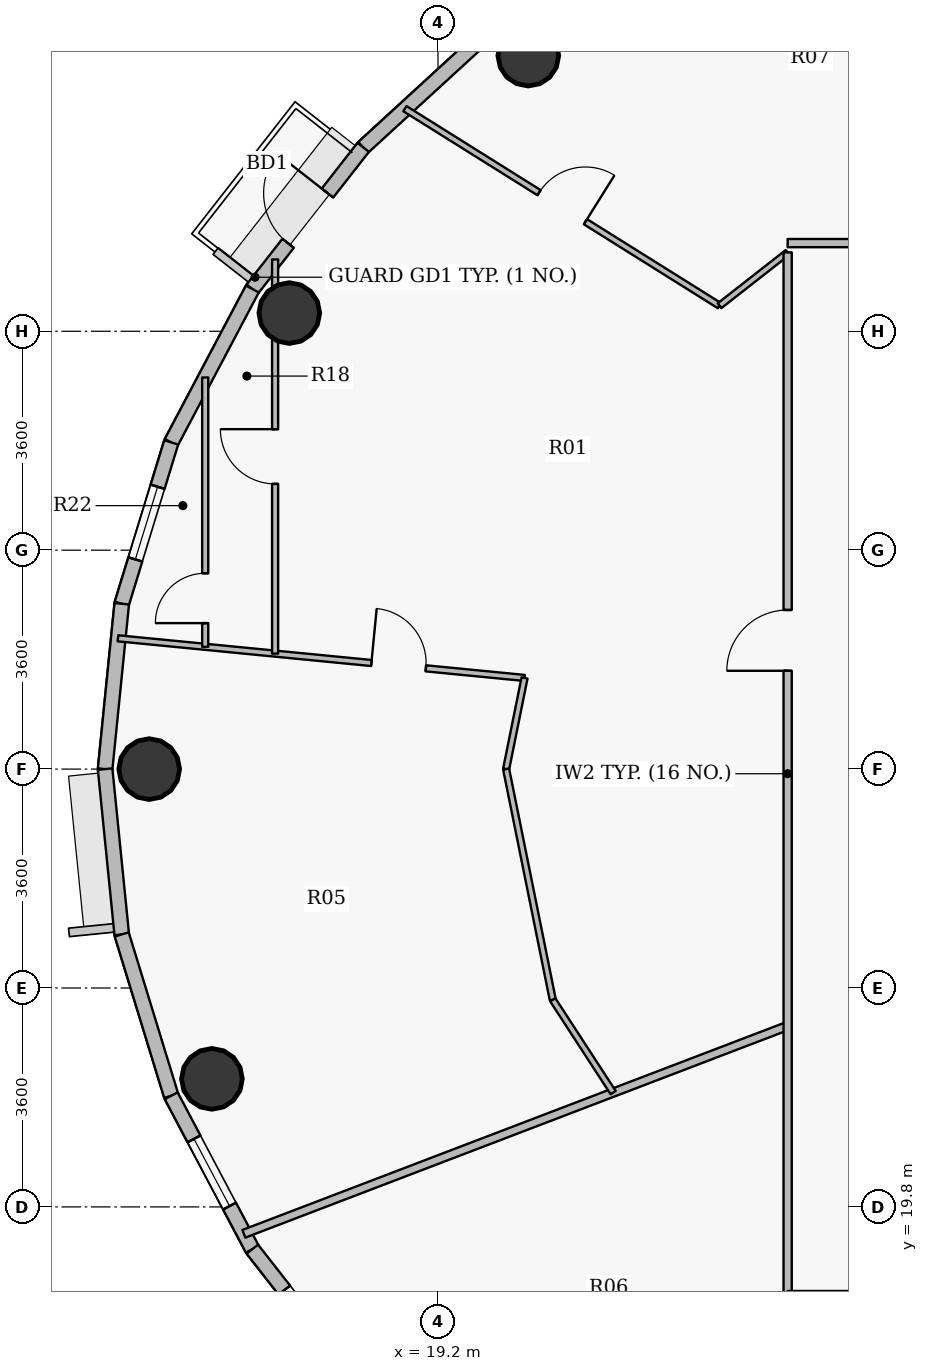
"""IFC4 building model, lengths in metres.
Left out: names, types, materials, properties, quantities, classifications, styles, units other than length and angle.
Written with IfcOpenShell. Run it as: python <this file> out.ifc"""

import sys

from ifc_helpers import new_model, si_unit, direction, frame, frame_2d, origin, origin_2d, place, context, subcontext, project, spatial, rectangle, hollow_circle, extrude, source, transform, mapped, element, fill, save


model = new_model("IFC4")
c1 = context("Model", 3, precision=1e-05, world=origin(), true_north=direction((0.0, 1.0)))
c2 = subcontext(c1, "Body", "Model", "MODEL_VIEW")
j1 = project(units=[si_unit("LENGTHUNIT", "METRE"), si_unit("PLANEANGLEUNIT", "RADIAN")], contexts=[c1])
p1 = place(None, origin())
s1 = spatial("IfcSite", under=j1, at=p1, CompositionType="ELEMENT")
p2 = place(p1, origin())
s2 = spatial("IfcBuilding", under=s1, at=p2, CompositionType="ELEMENT")
p3 = place(p2, frame((0.0, 0.0, 284.25)))
s3 = spatial("IfcBuildingStorey", under=s2, at=p3, CompositionType="ELEMENT", Elevation=284.25)
for number, where, z_axis, x_axis in (
    (1, (20.685, 38.733, 0.0), (0.0, 0.0, 1.0), (1.0, 0.0, 0.0)),
    (2, (16.754, 34.5, 0.0), (0.0, 0.0, 1.0), (1.0, 0.0, 0.0)),
    (3, (14.45, 27.0, 0.0), (0.0, 0.0, 1.0), (1.0, 0.0, 0.0)),
    (4, (15.481, 21.906, 0.0), (0.0, 0.0, 1.0), (1.0, 0.0, 0.0)),
):
    element("IfcColumn", number, at=place(p3, frame(where, z_axis=z_axis, x_axis=x_axis)), inside=s3, PredefinedType="COLUMN", context=c2, shape_type="SweptSolid", body=[
        extrude(hollow_circle(Radius=0.5, WallThickness=0.032, at=origin_2d()), origin(), (0.0, 0.0, 1.0), 3.75),
    ])
p4 = place(p3, frame((17.97, 37.225, 0.0), z_axis=(0.0, 0.0, 1.0), x_axis=(0.737068506972, 0.675818034703, 0.0)))
e5 = element("IfcWall", 5, at=p4, inside=s3, PredefinedType="SOLIDWALL", context=c2, shape_type="SweptSolid", body=[
    extrude(rectangle(XDim=3.077, YDim=0.24, at=frame_2d((1.539, 0.0))), origin(), (0.0, 0.0, 1.0), 3.5),
])
p5 = place(p3, frame((16.146, 34.895, 0.0), z_axis=(0.0, 0.0, 1.0), x_axis=(0.616337186556, 0.787482363275, 0.0)))
e6 = element("IfcWall", 6, at=p5, inside=s3, PredefinedType="SOLIDWALL", context=c2, shape_type="SweptSolid", body=[
    extrude(rectangle(XDim=2.958, YDim=0.24, at=frame_2d((1.479, 0.0))), origin(), (0.0, 0.0, 1.0), 3.5),
])
p6 = place(p5, frame((0.954, 0.0, 0.0)))
e7 = element("IfcOpeningElement", 7, at=p6, cuts=e6, PredefinedType="OPENING", context=c2, shape_type="SweptSolid", body=[
    extrude(rectangle(XDim=1.05, YDim=2.15, at=origin_2d()), frame((0.525, 0.13, 1.075), z_axis=(0.0, -1.0, 0.0), x_axis=(1.0, 0.0, 0.0)), (0.0, 0.0, 1.0), 0.26),
])
p7 = place(p3, frame((14.812, 32.372, 0.0), z_axis=(0.0, 0.0, 1.0), x_axis=(0.467628269026, 0.883925224218, 0.0)))
e8 = element("IfcWall", 8, at=p7, inside=s3, PredefinedType="SOLIDWALL", context=c2, shape_type="SweptSolid", body=[
    extrude(rectangle(XDim=2.854, YDim=0.24, at=frame_2d((1.427, 0.0))), origin(), (0.0, 0.0, 1.0), 3.5),
])
p8 = place(p3, frame((13.998, 29.719, 0.0), z_axis=(0.0, 0.0, 1.0), x_axis=(0.2931213403, 0.956075248012, 0.0)))
e9 = element("IfcWall", 9, at=p8, inside=s3, PredefinedType="SOLIDWALL", context=c2, shape_type="SweptSolid", body=[
    extrude(rectangle(XDim=2.775, YDim=0.24, at=frame_2d((1.388, 0.0))), origin(), (0.0, 0.0, 1.0), 3.5),
])
p9 = place(p8, frame((0.763, 0.0, 0.9)))
e10 = element("IfcOpeningElement", 10, at=p9, cuts=e9, PredefinedType="OPENING", context=c2, shape_type="SweptSolid", body=[
    extrude(rectangle(XDim=1.25, YDim=1.65, at=origin_2d()), frame((0.625, 0.13, 0.825), z_axis=(0.0, -1.0, 0.0), x_axis=(1.0, 0.0, 0.0)), (0.0, 0.0, 1.0), 0.26),
])
for number, where, z_axis, x_axis in (
    (11, (13.725, 27.0, 0.0), (0.0, 0.0, 1.0), (0.1, 0.995, 0.0)),
    (12, (13.998, 24.281, 0.0), (0.0, 0.0, 1.0), (-0.1, 0.995, 0.0)),
):
    element("IfcWall", number, at=place(p3, frame(where, z_axis=z_axis, x_axis=x_axis)), inside=s3, PredefinedType="SOLIDWALL", context=c2, shape_type="SweptSolid", body=[
        extrude(rectangle(XDim=2.733, YDim=0.24, at=frame_2d((1.366, 0.0))), origin(), (0.0, 0.0, 1.0), 3.5),
    ])
p10 = place(p3, frame((14.812, 21.628, 0.0), z_axis=(0.0, 0.0, 1.0), x_axis=(-0.2931213403, 0.956075248012, 0.0)))
e13 = element("IfcWall", 13, at=p10, inside=s3, PredefinedType="SOLIDWALL", context=c2, shape_type="SweptSolid", body=[
    extrude(rectangle(XDim=2.775, YDim=0.24, at=frame_2d((1.388, 0.0))), origin(), (0.0, 0.0, 1.0), 3.5),
])
p11 = place(p3, frame((16.146, 19.105, 0.0), z_axis=(0.0, 0.0, 1.0), x_axis=(-0.467628269026, 0.883925224218, 0.0)))
e14 = element("IfcWall", 14, at=p11, inside=s3, PredefinedType="SOLIDWALL", context=c2, shape_type="SweptSolid", body=[
    extrude(rectangle(XDim=2.854, YDim=0.24, at=frame_2d((1.427, 0.0))), origin(), (0.0, 0.0, 1.0), 3.5),
])
p12 = place(p11, frame((0.802, 0.0, 0.9)))
e15 = element("IfcOpeningElement", 15, at=p12, cuts=e14, PredefinedType="OPENING", context=c2, shape_type="SweptSolid", body=[
    extrude(rectangle(XDim=1.25, YDim=1.65, at=origin_2d()), frame((0.625, 0.13, 0.825), z_axis=(0.0, -1.0, 0.0), x_axis=(1.0, 0.0, 0.0)), (0.0, 0.0, 1.0), 0.26),
])
p13 = place(p3, frame((17.97, 16.775, 0.0), z_axis=(0.0, 0.0, 1.0), x_axis=(-0.616337186556, 0.787482363275, 0.0)))
e16 = element("IfcWall", 16, at=p13, inside=s3, PredefinedType="SOLIDWALL", context=c2, shape_type="SweptSolid", body=[
    extrude(rectangle(XDim=2.958, YDim=0.24, at=frame_2d((1.479, 0.0))), origin(), (0.0, 0.0, 1.0), 3.5),
])
p14 = place(p13, frame((0.854, 0.0, 0.9)))
e17 = element("IfcOpeningElement", 17, at=p14, cuts=e16, PredefinedType="OPENING", context=c2, shape_type="SweptSolid", body=[
    extrude(rectangle(XDim=1.25, YDim=1.65, at=origin_2d()), frame((0.625, 0.13, 0.825), z_axis=(0.0, -1.0, 0.0), x_axis=(1.0, 0.0, 0.0)), (0.0, 0.0, 1.0), 0.26),
])
p15 = place(p3, frame((13.936, 29.151, 0.0), z_axis=(0.0, 0.0, 1.0), x_axis=(0.995282339379, -0.097020950936, 0.0)))
e18 = element("IfcWall", 18, at=p15, inside=s3, PredefinedType="PARTITIONING", context=c2, shape_type="SweptSolid", body=[
    extrude(rectangle(XDim=6.719, YDim=0.1, at=frame_2d((3.359, 0.0))), origin(), (0.0, 0.0, 1.0), 2.985),
])
p16 = place(p15, frame((4.188, 0.0, 0.0)))
e19 = element("IfcOpeningElement", 19, at=p16, cuts=e18, PredefinedType="OPENING", context=c2, shape_type="SweptSolid", body=[
    extrude(rectangle(XDim=0.9, YDim=2.1, at=origin_2d()), frame((0.45, 0.06, 1.05), z_axis=(0.0, -1.0, 0.0), x_axis=(1.0, 0.0, 0.0)), (0.0, 0.0, 1.0), 0.12),
])
p17 = place(p3, frame((15.371, 29.011, 0.0), z_axis=(0.0, 0.0, 1.0), x_axis=(0.0, 1.0, 0.0)))
e20 = element("IfcWall", 20, at=p17, inside=s3, PredefinedType="PARTITIONING", context=c2, shape_type="SweptSolid", body=[
    extrude(rectangle(XDim=4.429, YDim=0.1, at=frame_2d((2.215, 0.0))), origin(), (0.0, 0.0, 1.0), 2.985),
])
p18 = place(p17, frame((0.389, 0.0, 0.0)))
e21 = element("IfcOpeningElement", 21, at=p18, cuts=e20, PredefinedType="OPENING", context=c2, shape_type="SweptSolid", body=[
    extrude(rectangle(XDim=0.82, YDim=2.1, at=origin_2d()), frame((0.41, 0.06, 1.05), z_axis=(0.0, -1.0, 0.0), x_axis=(1.0, 0.0, 0.0)), (0.0, 0.0, 1.0), 0.12),
])
p19 = place(p3, frame((16.007, 19.358, 0.0), z_axis=(0.0, 0.0, 1.0), x_axis=(0.934094110355, 0.35702687994, 0.0)))
e22 = element("IfcWall", 22, at=p19, inside=s3, PredefinedType="PARTITIONING", context=c2, shape_type="SweptSolid", body=[
    extrude(rectangle(XDim=9.574, YDim=0.135, at=frame_2d((4.787, 0.0))), origin(), (0.0, 0.0, 1.0), 2.985),
])
p20 = place(p3, frame((16.521, 28.899, 0.0), z_axis=(0.0, 0.0, 1.0), x_axis=(0.0, 1.0, 0.0)))
e23 = element("IfcWall", 23, at=p20, inside=s3, PredefinedType="PARTITIONING", context=c2, shape_type="SweptSolid", body=[
    extrude(rectangle(XDim=6.482, YDim=0.1, at=frame_2d((3.241, 0.0))), origin(), (0.0, 0.0, 1.0), 2.985),
])
p21 = place(p20, frame((2.791, 0.0, 0.0)))
e24 = element("IfcOpeningElement", 24, at=p21, cuts=e23, PredefinedType="OPENING", context=c2, shape_type="SweptSolid", body=[
    extrude(rectangle(XDim=0.9, YDim=2.1, at=origin_2d()), frame((0.45, 0.06, 1.05), z_axis=(0.0, -1.0, 0.0), x_axis=(1.0, 0.0, 0.0)), (0.0, 0.0, 1.0), 0.12),
])
p22 = place(p3, frame((18.656, 37.861, 0.0), z_axis=(0.0, 0.0, 1.0), x_axis=(0.847553170054, -0.530710489751, 0.0)))
e25 = element("IfcWall", 25, at=p22, inside=s3, PredefinedType="PARTITIONING", context=c2, shape_type="SweptSolid", body=[
    extrude(rectangle(XDim=6.105, YDim=0.1, at=frame_2d((3.052, 0.0))), origin(), (0.0, 0.0, 1.0), 2.985),
])
p23 = place(p22, frame((2.603, 0.0, 0.0)))
e26 = element("IfcOpeningElement", 26, at=p23, cuts=e25, PredefinedType="OPENING", context=c2, shape_type="SweptSolid", body=[
    extrude(rectangle(XDim=0.9, YDim=2.1, at=origin_2d()), frame((0.45, 0.06, 1.05), z_axis=(0.0, -1.0, 0.0), x_axis=(1.0, 0.0, 0.0)), (0.0, 0.0, 1.0), 0.12),
])
p24 = place(p3, frame((20.32, 27.0, 0.0), z_axis=(0.0, 0.0, 1.0), x_axis=(0.198264574188, 0.98014853906, 0.0)))
e27 = element("IfcWall", 27, at=p24, inside=s3, PredefinedType="PARTITIONING", context=c2, shape_type="SweptSolid", body=[
    extrude(rectangle(XDim=1.529, YDim=0.1, at=frame_2d((0.765, 0.0))), origin(), (0.0, 0.0, 1.0), 3.035),
])
p25 = place(p3, frame((20.32, 27.0, 0.0), z_axis=(0.0, 0.0, 1.0), x_axis=(0.198226068862, -0.980156327135, 0.0)))
e28 = element("IfcWall", 28, at=p25, inside=s3, PredefinedType="PARTITIONING", context=c2, shape_type="SweptSolid", body=[
    extrude(rectangle(XDim=3.871, YDim=0.1, at=frame_2d((1.936, 0.0))), origin(), (0.0, 0.0, 1.0), 3.035),
])
p26 = place(p3, frame((21.087, 23.206, 0.0), z_axis=(0.0, 0.0, 1.0), x_axis=(0.545384128846, -0.838186227519, 0.0)))
e29 = element("IfcWall", 29, at=p26, inside=s3, PredefinedType="PARTITIONING", context=c2, shape_type="SweptSolid", body=[
    extrude(rectangle(XDim=1.821, YDim=0.1, at=frame_2d((0.911, 0.0))), origin(), (0.0, 0.0, 1.0), 3.035),
])
p27 = place(p3, frame((23.83, 34.621, 0.0), z_axis=(0.0, 0.0, 1.0), x_axis=(0.787407186809, 0.616433226037, 0.0)))
e30 = element("IfcWall", 30, at=p27, inside=s3, PredefinedType="PARTITIONING", context=c2, shape_type="SweptSolid", body=[
    extrude(rectangle(XDim=1.422, YDim=0.1, at=frame_2d((0.711, 0.0))), origin(), (0.0, 0.0, 1.0), 3.035),
])
p28 = place(p3, frame((24.95, 18.35, 0.0), z_axis=(0.0, 0.0, 1.0), x_axis=(0.0, 1.0, 0.0)))
e31 = element("IfcWall", 31, at=p28, inside=s3, PredefinedType="PARTITIONING", context=c2, shape_type="SweptSolid", body=[
    extrude(rectangle(XDim=17.147, YDim=0.135, at=frame_2d((8.574, 0.0))), origin(), (0.0, 0.0, 1.0), 3.035),
])
p29 = place(p28, frame((10.267, 0.0, 0.0)))
e32 = element("IfcOpeningElement", 32, at=p29, cuts=e31, PredefinedType="OPENING", context=c2, shape_type="SweptSolid", body=[
    extrude(rectangle(XDim=1.0, YDim=2.15, at=origin_2d()), frame((0.5, 0.078, 1.075), z_axis=(0.0, -1.0, 0.0), x_axis=(1.0, 0.0, 0.0)), (0.0, 0.0, 1.0), 0.155),
])
p30 = place(p3, frame((24.95, 18.35, 0.0), z_axis=(0.0, 0.0, 1.0), x_axis=(1.0, 0.0, 0.0)))
e33 = element("IfcWall", 33, at=p30, inside=s3, PredefinedType="PARTITIONING", context=c2, shape_type="SweptSolid", body=[
    extrude(rectangle(XDim=10.1, YDim=0.135, at=frame_2d((5.05, 0.0))), origin(), (0.0, 0.0, 1.0), 3.035),
])
p31 = place(p30, frame((4.627, 0.0, 0.0)))
e34 = element("IfcOpeningElement", 34, at=p31, cuts=e33, PredefinedType="OPENING", context=c2, shape_type="SweptSolid", body=[
    extrude(rectangle(XDim=1.0, YDim=2.15, at=origin_2d()), frame((0.5, 0.078, 1.075), z_axis=(0.0, -1.0, 0.0), x_axis=(1.0, 0.0, 0.0)), (0.0, 0.0, 1.0), 0.155),
])
p32 = place(p3, frame((24.95, 35.65, 0.0), z_axis=(0.0, 0.0, 1.0), x_axis=(1.0, 0.0, 0.0)))
e35 = element("IfcWall", 35, at=p32, inside=s3, PredefinedType="PARTITIONING", context=c2, shape_type="SweptSolid", body=[
    extrude(rectangle(XDim=10.1, YDim=0.135, at=frame_2d((5.05, 0.0))), origin(), (0.0, 0.0, 1.0), 3.035),
])
m1 = source(origin(), c2, "Body", "SweptSolid", [
    extrude(rectangle(XDim=1.05, YDim=2.15, at=origin_2d()), frame((0.525, 0.025, 1.075), z_axis=(0.0, -1.0, 0.0), x_axis=(1.0, 0.0, 0.0)), (0.0, 0.0, 1.0), 0.05),
])
p33 = place(p6, origin())
e36 = element("IfcDoor", 36, at=p33, inside=s3, OperationType="SINGLE_SWING_RIGHT", PredefinedType="DOOR", context=c2, shape_type="MappedRepresentation", body=[
    mapped(m1, transform((0.0, 0.0, 0.0), x_axis=(1.0, 0.0, 0.0), y_axis=(0.0, 1.0, 0.0), z_axis=(0.0, 0.0, 1.0), scale=1.0)),
])
fill(e7, e36)
m2 = source(origin(), c2, "Body", "SweptSolid", [
    extrude(rectangle(XDim=1.25, YDim=1.65, at=origin_2d()), frame((0.625, 0.03, 0.825), z_axis=(0.0, -1.0, 0.0), x_axis=(1.0, 0.0, 0.0)), (0.0, 0.0, 1.0), 0.06),
])
p34 = place(p9, origin())
e37 = element("IfcWindow", 37, at=p34, inside=s3, PartitioningType="SINGLE_PANEL", PredefinedType="WINDOW", context=c2, shape_type="MappedRepresentation", body=[
    mapped(m2, transform((0.0, 0.0, 0.0), x_axis=(1.0, 0.0, 0.0), y_axis=(0.0, 1.0, 0.0), z_axis=(0.0, 0.0, 1.0), scale=1.0)),
])
fill(e10, e37)
p35 = place(p14, origin())
e38 = element("IfcWindow", 38, at=p35, inside=s3, PartitioningType="SINGLE_PANEL", PredefinedType="WINDOW", context=c2, shape_type="MappedRepresentation", body=[
    mapped(m2, transform((0.0, 0.0, 0.0), x_axis=(1.0, 0.0, 0.0), y_axis=(0.0, 1.0, 0.0), z_axis=(0.0, 0.0, 1.0), scale=1.0)),
])
fill(e17, e38)
p36 = place(p12, origin())
e39 = element("IfcWindow", 39, at=p36, inside=s3, PartitioningType="SINGLE_PANEL", PredefinedType="WINDOW", context=c2, shape_type="MappedRepresentation", body=[
    mapped(m2, transform((0.0, 0.0, 0.0), x_axis=(1.0, 0.0, 0.0), y_axis=(0.0, 1.0, 0.0), z_axis=(0.0, 0.0, 1.0), scale=1.0)),
])
fill(e15, e39)
m3 = source(origin(), c2, "Body", "SweptSolid", [
    extrude(rectangle(XDim=1.0, YDim=2.15, at=origin_2d()), frame((0.5, 0.025, 1.075), z_axis=(0.0, -1.0, 0.0), x_axis=(1.0, 0.0, 0.0)), (0.0, 0.0, 1.0), 0.05),
])
p37 = place(p29, origin())
e40 = element("IfcDoor", 40, at=p37, inside=s3, OperationType="SINGLE_SWING_LEFT", PredefinedType="DOOR", context=c2, shape_type="MappedRepresentation", body=[
    mapped(m3, transform((0.0, 0.0, 0.0), x_axis=(1.0, 0.0, 0.0), y_axis=(0.0, 1.0, 0.0), z_axis=(0.0, 0.0, 1.0), scale=1.0)),
])
fill(e32, e40)
m4 = source(origin(), c2, "Body", "SweptSolid", [
    extrude(rectangle(XDim=0.9, YDim=2.1, at=origin_2d()), frame((0.45, 0.025, 1.05), z_axis=(0.0, -1.0, 0.0), x_axis=(1.0, 0.0, 0.0)), (0.0, 0.0, 1.0), 0.05),
])
p38 = place(p23, origin())
e41 = element("IfcDoor", 41, at=p38, inside=s3, OperationType="SINGLE_SWING_RIGHT", PredefinedType="DOOR", context=c2, shape_type="MappedRepresentation", body=[
    mapped(m4, transform((0.0, 0.0, 0.0), x_axis=(1.0, 0.0, 0.0), y_axis=(0.0, 1.0, 0.0), z_axis=(0.0, 0.0, 1.0), scale=1.0)),
])
fill(e26, e41)
p39 = place(p16, origin())
e42 = element("IfcDoor", 42, at=p39, inside=s3, OperationType="SINGLE_SWING_LEFT", PredefinedType="DOOR", context=c2, shape_type="MappedRepresentation", body=[
    mapped(m4, transform((0.0, 0.0, 0.0), x_axis=(1.0, 0.0, 0.0), y_axis=(0.0, 1.0, 0.0), z_axis=(0.0, 0.0, 1.0), scale=1.0)),
])
fill(e19, e42)
p40 = place(p21, origin())
e43 = element("IfcDoor", 43, at=p40, inside=s3, OperationType="SINGLE_SWING_RIGHT", PredefinedType="DOOR", context=c2, shape_type="MappedRepresentation", body=[
    mapped(m4, transform((0.0, 0.0, 0.0), x_axis=(1.0, 0.0, 0.0), y_axis=(0.0, 1.0, 0.0), z_axis=(0.0, 0.0, 1.0), scale=1.0)),
])
fill(e24, e43)
m5 = source(origin(), c2, "Body", "SweptSolid", [
    extrude(rectangle(XDim=0.82, YDim=2.1, at=origin_2d()), frame((0.41, 0.025, 1.05), z_axis=(0.0, -1.0, 0.0), x_axis=(1.0, 0.0, 0.0)), (0.0, 0.0, 1.0), 0.05),
])
p41 = place(p18, origin())
e44 = element("IfcDoor", 44, at=p41, inside=s3, OperationType="SINGLE_SWING_LEFT", PredefinedType="DOOR", context=c2, shape_type="MappedRepresentation", body=[
    mapped(m5, transform((0.0, 0.0, 0.0), x_axis=(1.0, 0.0, 0.0), y_axis=(0.0, 1.0, 0.0), z_axis=(0.0, 0.0, 1.0), scale=1.0)),
])
fill(e21, e44)
save(model, sys.argv[1])
